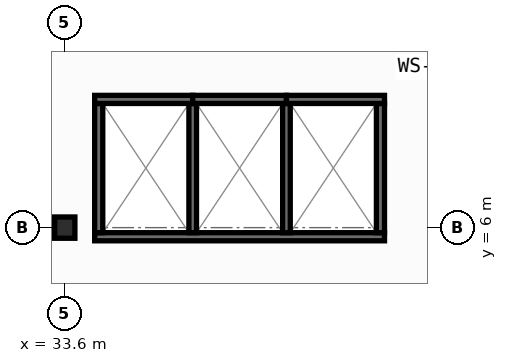
"""IFC4 building model, lengths in metres.
Left out: names, types, materials, properties, quantities, classifications, styles, units other than length and angle.
Written with IfcOpenShell. Run it as: python <this file> out.ifc"""

import sys

from ifc_helpers import new_model, si_unit, direction, frame, frame_2d, origin, origin_2d, place, context, subcontext, project, spatial, rectangle, i_section, extrude, element, save


model = new_model("IFC4")
c1 = context("Model", 3, precision=1e-05, world=origin(), true_north=direction((0.0, 1.0)))
c2 = subcontext(c1, "Body", "Model", "MODEL_VIEW")
j1 = project(units=[si_unit("LENGTHUNIT", "METRE"), si_unit("PLANEANGLEUNIT", "RADIAN")], contexts=[c1])
p1 = place(None, origin())
s1 = spatial("IfcSite", under=j1, at=p1, CompositionType="ELEMENT")
p2 = place(p1, origin())
s2 = spatial("IfcBuilding", under=s1, at=p2, CompositionType="ELEMENT")
p3 = place(p2, frame((0.0, 0.0, 4.5)))
s3 = spatial("IfcBuildingStorey", under=s2, at=p3, CompositionType="ELEMENT", Elevation=4.5)
p4 = place(p3, frame((33.6, 6.0, 0.0), z_axis=(0.0, 0.0, 1.0), x_axis=(1.0, 0.0, 0.0)))
e1 = element("IfcColumn", 1, at=p4, inside=s3, PredefinedType="COLUMN", context=c2, shape_type="SweptSolid", body=[
    extrude(i_section(OverallWidth=0.4, OverallDepth=0.42, WebThickness=0.025, FlangeThickness=0.04, at=origin_2d()), origin(), (0.0, 0.0, 1.0), 4.5),
])
p5 = place(p3, frame((34.19, 5.82, 0.0), z_axis=(0.0, 0.0, 1.0), x_axis=(1.0, 0.0, 0.0)))
e2 = element("IfcWall", 2, at=p5, inside=s3, PredefinedType="SHEAR", context=c2, shape_type="SweptSolid", body=[
    extrude(rectangle(XDim=5.72, YDim=0.16, at=frame_2d((2.86, 0.0))), origin(), (0.0, 0.0, 1.0), 4.25),
])
for number, where, z_axis, x_axis in (
    (3, (34.27, 5.9, 0.0), (0.0, 0.0, 1.0), (0.0, 1.0, 0.0)),
    (4, (39.83, 5.9, 0.0), (0.0, 0.0, 1.0), (0.0, 1.0, 0.0)),
):
    element("IfcWall", number, at=place(p3, frame(where, z_axis=z_axis, x_axis=x_axis)), inside=s3, PredefinedType="SHEAR", context=c2, shape_type="SweptSolid", body=[
        extrude(rectangle(XDim=2.55, YDim=0.16, at=frame_2d((1.275, 0.0))), origin(), (0.0, 0.0, 1.0), 4.25),
    ])
for number, where, z_axis, x_axis in (
    (5, (36.125, 5.9, 0.0), (0.0, 0.0, 1.0), (0.0, 1.0, 0.0)),
    (6, (37.975, 5.9, 0.0), (0.0, 0.0, 1.0), (0.0, 1.0, 0.0)),
):
    element("IfcWall", number, at=place(p3, frame(where, z_axis=z_axis, x_axis=x_axis)), inside=s3, PredefinedType="SHEAR", context=c2, shape_type="SweptSolid", body=[
        extrude(rectangle(XDim=2.55, YDim=0.15, at=frame_2d((1.275, 0.0))), origin(), (0.0, 0.0, 1.0), 4.25),
    ])
p6 = place(p3, frame((34.19, 8.53, 0.0), z_axis=(0.0, 0.0, 1.0), x_axis=(1.0, 0.0, 0.0)))
e7 = element("IfcWall", 7, at=p6, inside=s3, PredefinedType="SHEAR", context=c2, shape_type="SweptSolid", body=[
    extrude(rectangle(XDim=1.935, YDim=0.16, at=frame_2d((0.968, 0.0))), origin(), (0.0, 0.0, 1.0), 4.25),
])
p7 = place(p3, frame((36.125, 8.53, 0.0), z_axis=(0.0, 0.0, 1.0), x_axis=(1.0, 0.0, 0.0)))
e8 = element("IfcWall", 8, at=p7, inside=s3, PredefinedType="SHEAR", context=c2, shape_type="SweptSolid", body=[
    extrude(rectangle(XDim=1.85, YDim=0.16, at=frame_2d((0.925, 0.0))), origin(), (0.0, 0.0, 1.0), 4.25),
])
p8 = place(p3, frame((37.975, 8.53, 0.0), z_axis=(0.0, 0.0, 1.0), x_axis=(1.0, 0.0, 0.0)))
e9 = element("IfcWall", 9, at=p8, inside=s3, PredefinedType="SHEAR", context=c2, shape_type="SweptSolid", body=[
    extrude(rectangle(XDim=1.935, YDim=0.16, at=frame_2d((0.967, 0.0))), origin(), (0.0, 0.0, 1.0), 4.25),
])
save(model, sys.argv[1])
